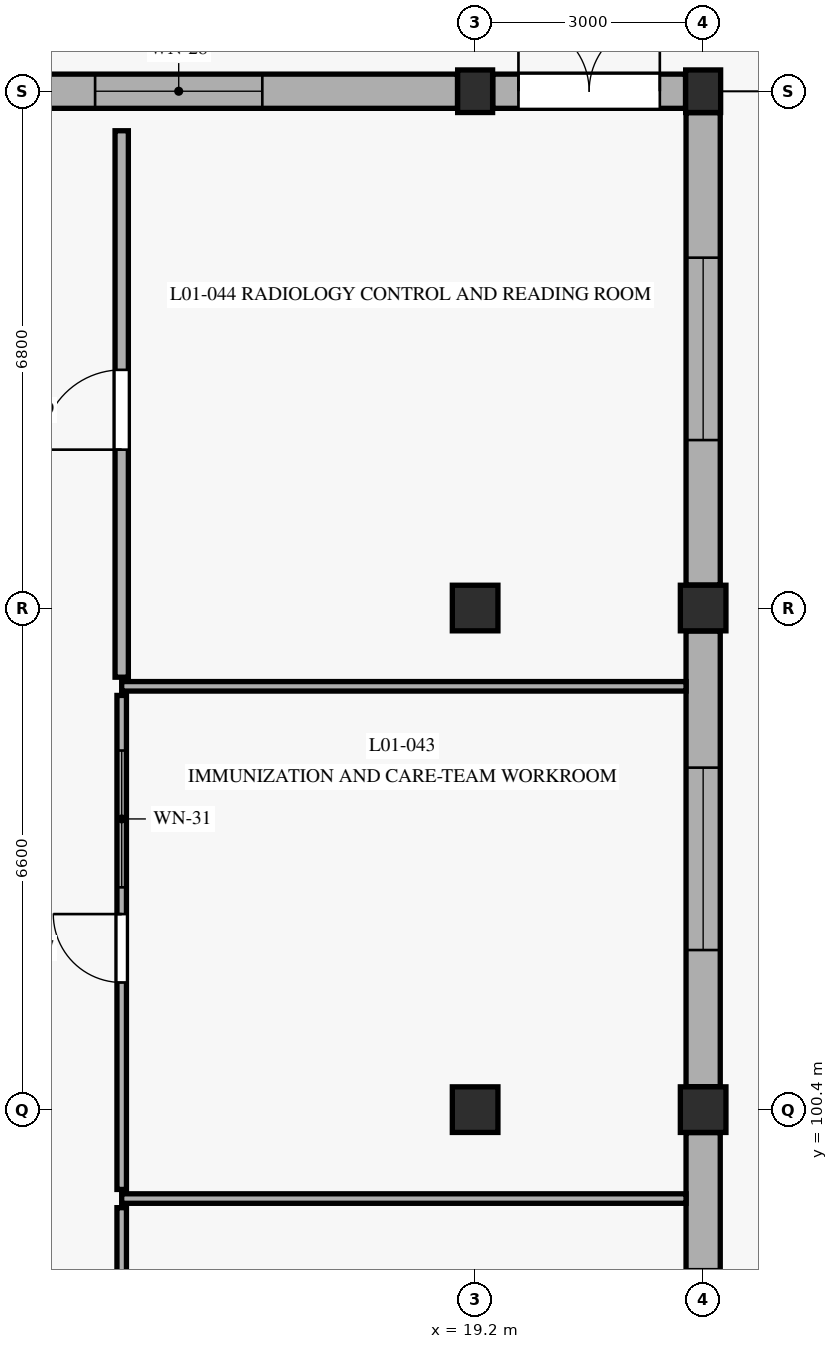
"""IFC4 building model, lengths in metres.
Left out: names, types, materials, properties, quantities, classifications, styles, units other than length and angle.
Written with IfcOpenShell. Run it as: python <this file> out.ifc"""

import sys

from ifc_helpers import new_model, si_unit, direction, frame, frame_2d, origin, origin_with_axes, origin_2d, place, context, subcontext, project, spatial, rectangle, extrude, element, fill, save


model = new_model("IFC4")
c1 = context("Model", 3, precision=1e-05, world=origin(), true_north=direction((0.0, 1.0)))
c2 = subcontext(c1, "Body", "Model", "MODEL_VIEW")
j1 = project(units=[si_unit("LENGTHUNIT", "METRE"), si_unit("PLANEANGLEUNIT", "RADIAN")], contexts=[c1])
p1 = place(None, origin())
s1 = spatial("IfcSite", under=j1, at=p1, CompositionType="ELEMENT")
p2 = place(p1, origin())
s2 = spatial("IfcBuilding", under=s1, at=p2, CompositionType="ELEMENT")
p3 = place(p2, origin())
s3 = spatial("IfcBuildingStorey", under=s2, at=p3, CompositionType="ELEMENT", Elevation=0.0)
for number, where, z_axis, x_axis in (
    (1, (19.2, 100.4, 0.0), (0.0, 0.0, 1.0), (1.0, 0.0, 0.0)),
    (2, (19.2, 107.0, 0.0), (0.0, 0.0, 1.0), (1.0, 0.0, 0.0)),
):
    element("IfcColumn", number, at=place(p3, frame(where, z_axis=z_axis, x_axis=x_axis)), inside=s3, PredefinedType="COLUMN", context=c2, shape_type="SweptSolid", body=[
        extrude(rectangle(XDim=0.6, YDim=0.6, at=origin_2d()), origin(), (0.0, 0.0, 1.0), 4.8),
    ])
p4 = place(p3, frame((19.2, 113.8, 0.0), z_axis=(0.0, 0.0, 1.0), x_axis=(1.0, 0.0, 0.0)))
e3 = element("IfcColumn", 3, at=p4, inside=s3, PredefinedType="COLUMN", context=c2, shape_type="SweptSolid", body=[
    extrude(rectangle(XDim=0.46, YDim=0.56, at=origin_2d()), origin(), (0.0, 0.0, 1.0), 4.8),
])
for number, where, z_axis, x_axis in (
    (4, (22.2, 100.4, 0.0), (0.0, 0.0, 1.0), (1.0, 0.0, 0.0)),
    (5, (22.2, 107.0, 0.0), (0.0, 0.0, 1.0), (1.0, 0.0, 0.0)),
):
    element("IfcColumn", number, at=place(p3, frame(where, z_axis=z_axis, x_axis=x_axis)), inside=s3, PredefinedType="COLUMN", context=c2, shape_type="SweptSolid", body=[
        extrude(rectangle(XDim=0.6, YDim=0.6, at=origin_2d()), origin(), (0.0, 0.0, 1.0), 4.8),
    ])
p5 = place(p3, frame((22.2, 113.8, 0.0), z_axis=(0.0, 0.0, 1.0), x_axis=(1.0, 0.0, 0.0)))
e6 = element("IfcColumn", 6, at=p5, inside=s3, PredefinedType="COLUMN", context=c2, shape_type="SweptSolid", body=[
    extrude(rectangle(XDim=0.46, YDim=0.56, at=origin_2d()), origin(), (0.0, 0.0, 1.0), 4.8),
])
p6 = place(p3, frame((22.2, 94.102, 0.0), z_axis=(0.0, 0.0, 1.0), x_axis=(0.0, 1.0, 0.0)))
e7 = element("IfcWall", 7, at=p6, inside=s3, PredefinedType="SOLIDWALL", context=c2, shape_type="SweptSolid", body=[
    extrude(rectangle(XDim=5.996, YDim=0.45, at=frame_2d((2.998, 0.0))), origin(), (0.0, 0.0, 1.0), 3.96),
])
p7 = place(p6, frame((1.798, 0.0, 0.6)))
e8 = element("IfcOpeningElement", 8, at=p7, cuts=e7, PredefinedType="OPENING", context=c2, shape_type="SweptSolid", body=[
    extrude(rectangle(XDim=2.4, YDim=2.5, at=frame_2d((1.2, 1.25))), frame((0.0, 0.235, 0.0), z_axis=(0.0, -1.0, 0.0), x_axis=(1.0, 0.0, 0.0)), (0.0, 0.0, 1.0), 0.47),
])
p8 = place(p3, frame((22.2, 100.702, 0.0), z_axis=(0.0, 0.0, 1.0), x_axis=(0.0, 1.0, 0.0)))
e9 = element("IfcWall", 9, at=p8, inside=s3, PredefinedType="SOLIDWALL", context=c2, shape_type="SweptSolid", body=[
    extrude(rectangle(XDim=5.996, YDim=0.45, at=frame_2d((2.998, 0.0))), origin(), (0.0, 0.0, 1.0), 4.09),
])
p9 = place(p8, frame((1.798, 0.0, 0.6)))
e10 = element("IfcOpeningElement", 10, at=p9, cuts=e9, PredefinedType="OPENING", context=c2, shape_type="SweptSolid", body=[
    extrude(rectangle(XDim=2.4, YDim=2.5, at=frame_2d((1.2, 1.25))), frame((0.0, 0.235, 0.0), z_axis=(0.0, -1.0, 0.0), x_axis=(1.0, 0.0, 0.0)), (0.0, 0.0, 1.0), 0.47),
])
p10 = place(p3, frame((22.2, 107.302, 0.0), z_axis=(0.0, 0.0, 1.0), x_axis=(0.0, 1.0, 0.0)))
e11 = element("IfcWall", 11, at=p10, inside=s3, PredefinedType="SOLIDWALL", context=c2, shape_type="SweptSolid", body=[
    extrude(rectangle(XDim=6.216, YDim=0.45, at=frame_2d((3.108, 0.0))), origin(), (0.0, 0.0, 1.0), 4.09),
])
p11 = place(p10, frame((1.908, 0.0, 0.6)))
e12 = element("IfcOpeningElement", 12, at=p11, cuts=e11, PredefinedType="OPENING", context=c2, shape_type="SweptSolid", body=[
    extrude(rectangle(XDim=2.4, YDim=2.5, at=frame_2d((1.2, 1.25))), frame((0.0, 0.235, 0.0), z_axis=(0.0, -1.0, 0.0), x_axis=(1.0, 0.0, 0.0)), (0.0, 0.0, 1.0), 0.47),
])
p12 = place(p3, frame((21.968, 113.8, 0.0), z_axis=(0.0, 0.0, 1.0), x_axis=(-1.0, 0.0, 0.0)))
e13 = element("IfcWall", 13, at=p12, inside=s3, PredefinedType="SOLIDWALL", context=c2, shape_type="SweptSolid", body=[
    extrude(rectangle(XDim=2.536, YDim=0.45, at=frame_2d((1.268, 0.0))), origin(), (0.0, 0.0, 1.0), 3.92),
])
p13 = place(p12, frame((0.338, 0.0, 0.0)))
e14 = element("IfcOpeningElement", 14, at=p13, cuts=e13, PredefinedType="OPENING", context=c2, shape_type="SweptSolid", body=[
    extrude(rectangle(XDim=1.86, YDim=2.5, at=frame_2d((0.93, 1.25))), frame((0.0, 0.235, 0.0), z_axis=(0.0, -1.0, 0.0), x_axis=(1.0, 0.0, 0.0)), (0.0, 0.0, 1.0), 0.47),
])
p14 = place(p3, frame((18.968, 113.8, 0.0), z_axis=(0.0, 0.0, 1.0), x_axis=(-1.0, 0.0, 0.0)))
e15 = element("IfcWall", 15, at=p14, inside=s3, PredefinedType="SOLIDWALL", context=c2, shape_type="SweptSolid", body=[
    extrude(rectangle(XDim=7.336, YDim=0.45, at=frame_2d((3.668, 0.0))), origin(), (0.0, 0.0, 1.0), 3.92),
])
p15 = place(p14, frame((2.568, 0.0, 0.9)))
e16 = element("IfcOpeningElement", 16, at=p15, cuts=e15, PredefinedType="OPENING", context=c2, shape_type="SweptSolid", body=[
    extrude(rectangle(XDim=2.2, YDim=1.1, at=frame_2d((1.1, 0.55))), frame((0.0, 0.235, 0.0), z_axis=(0.0, -1.0, 0.0), x_axis=(1.0, 0.0, 0.0)), (0.0, 0.0, 1.0), 0.47),
])
p16 = place(p3, frame((14.55, 94.12, 0.0), z_axis=(0.0, 0.0, 1.0), x_axis=(0.0, 1.0, 0.0)))
e17 = element("IfcWall", 17, at=p16, inside=s3, PredefinedType="PARTITIONING", context=c2, shape_type="SweptSolid", body=[
    extrude(rectangle(XDim=4.99, YDim=0.125, at=frame_2d((2.495, 0.0))), origin(), (0.0, 0.0, 1.0), 4.015),
])
p17 = place(p16, frame((1.91, 0.0, 0.0)))
e18 = element("IfcOpeningElement", 18, at=p17, cuts=e17, PredefinedType="OPENING", context=c2, shape_type="SweptSolid", body=[
    extrude(rectangle(XDim=1.02, YDim=2.18, at=frame_2d((0.51, 1.09))), frame((0.0, 0.073, 0.0), z_axis=(0.0, -1.0, 0.0), x_axis=(1.0, 0.0, 0.0)), (0.0, 0.0, 1.0), 0.145),
])
p18 = place(p3, frame((14.55, 99.23, 0.0), z_axis=(0.0, 0.0, 1.0), x_axis=(1.0, 0.0, 0.0)))
e19 = element("IfcWall", 19, at=p18, inside=s3, PredefinedType="PARTITIONING", context=c2, shape_type="SweptSolid", body=[
    extrude(rectangle(XDim=7.425, YDim=0.125, at=frame_2d((3.712, 0.0))), origin(), (0.0, 0.0, 1.0), 3.895),
])
p19 = place(p3, frame((14.55, 99.35, 0.0), z_axis=(0.0, 0.0, 1.0), x_axis=(0.0, 1.0, 0.0)))
e20 = element("IfcWall", 20, at=p19, inside=s3, PredefinedType="PARTITIONING", context=c2, shape_type="SweptSolid", body=[
    extrude(rectangle(XDim=6.5, YDim=0.125, at=frame_2d((3.25, 0.0))), origin(), (0.0, 0.0, 1.0), 4.015),
])
p20 = place(p19, frame((2.723, 0.0, 0.0)))
e21 = element("IfcOpeningElement", 21, at=p20, cuts=e20, PredefinedType="OPENING", context=c2, shape_type="SweptSolid", body=[
    extrude(rectangle(XDim=0.9, YDim=2.12, at=frame_2d((0.45, 1.06))), frame((0.0, 0.073, 0.0), z_axis=(0.0, -1.0, 0.0), x_axis=(1.0, 0.0, 0.0)), (0.0, 0.0, 1.0), 0.145),
])
p21 = place(p19, frame((3.975, 0.0, 1.05)))
e22 = element("IfcOpeningElement", 22, at=p21, cuts=e20, PredefinedType="OPENING", context=c2, shape_type="SweptSolid", body=[
    extrude(rectangle(XDim=1.8, YDim=1.25, at=frame_2d((0.9, 0.625))), frame((0.0, 0.073, 0.0), z_axis=(0.0, -1.0, 0.0), x_axis=(1.0, 0.0, 0.0)), (0.0, 0.0, 1.0), 0.145),
])
p22 = place(p3, frame((14.55, 105.97, 0.0), z_axis=(0.0, 0.0, 1.0), x_axis=(1.0, 0.0, 0.0)))
e23 = element("IfcWall", 23, at=p22, inside=s3, PredefinedType="PARTITIONING", context=c2, shape_type="SweptSolid", body=[
    extrude(rectangle(XDim=7.425, YDim=0.125, at=frame_2d((3.712, 0.0))), origin(), (0.0, 0.0, 1.0), 3.895),
])
p23 = place(p3, frame((14.55, 106.09, 0.0), z_axis=(0.0, 0.0, 1.0), x_axis=(0.0, 1.0, 0.0)))
e24 = element("IfcWall", 24, at=p23, inside=s3, PredefinedType="PARTITIONING", context=c2, shape_type="SweptSolid", body=[
    extrude(rectangle(XDim=7.19, YDim=0.175, at=frame_2d((3.595, 0.0))), origin(), (0.0, 0.0, 1.0), 4.015),
])
p24 = place(p23, frame((2.994, 0.0, 0.0)))
e25 = element("IfcOpeningElement", 25, at=p24, cuts=e24, PredefinedType="OPENING", context=c2, shape_type="SweptSolid", body=[
    extrude(rectangle(XDim=1.05, YDim=2.24, at=frame_2d((0.525, 1.12))), frame((0.0, 0.098, 0.0), z_axis=(0.0, -1.0, 0.0), x_axis=(1.0, 0.0, 0.0)), (0.0, 0.0, 1.0), 0.195),
])
p25 = place(p9, origin_with_axes())
e26 = element("IfcWindow", 26, at=p25, inside=s3, PartitioningType="SINGLE_PANEL", PredefinedType="WINDOW", context=c2, shape_type="SweptSolid", body=[
    extrude(rectangle(XDim=2.4, YDim=2.5, at=frame_2d((1.2, 1.25))), frame((0.0, 0.03, 0.0), z_axis=(0.0, -1.0, 0.0), x_axis=(1.0, 0.0, 0.0)), (0.0, 0.0, 1.0), 0.06),
])
fill(e10, e26)
p26 = place(p11, origin_with_axes())
e27 = element("IfcWindow", 27, at=p26, inside=s3, PartitioningType="SINGLE_PANEL", PredefinedType="WINDOW", context=c2, shape_type="SweptSolid", body=[
    extrude(rectangle(XDim=2.4, YDim=2.5, at=frame_2d((1.2, 1.25))), frame((0.0, 0.03, 0.0), z_axis=(0.0, -1.0, 0.0), x_axis=(1.0, 0.0, 0.0)), (0.0, 0.0, 1.0), 0.06),
])
fill(e12, e27)
p27 = place(p13, frame((1.86, 0.0, 0.0), z_axis=(0.0, 0.0, 1.0), x_axis=(-1.0, 0.0, 0.0)))
e28 = element("IfcDoor", 28, at=p27, inside=s3, OperationType="DOUBLE_DOOR_SINGLE_SWING", PredefinedType="DOOR", context=c2, shape_type="SweptSolid", body=[
    extrude(rectangle(XDim=1.86, YDim=2.5, at=frame_2d((0.93, 1.25))), frame((0.0, 0.025, 0.0), z_axis=(0.0, -1.0, 0.0), x_axis=(1.0, 0.0, 0.0)), (0.0, 0.0, 1.0), 0.05),
])
fill(e14, e28)
p28 = place(p15, origin_with_axes())
e29 = element("IfcWindow", 29, at=p28, inside=s3, PartitioningType="SINGLE_PANEL", PredefinedType="WINDOW", context=c2, shape_type="SweptSolid", body=[
    extrude(rectangle(XDim=2.2, YDim=1.1, at=frame_2d((1.1, 0.55))), frame((0.0, 0.03, 0.0), z_axis=(0.0, -1.0, 0.0), x_axis=(1.0, 0.0, 0.0)), (0.0, 0.0, 1.0), 0.06),
])
fill(e16, e29)
p29 = place(p20, frame((0.9, 0.0, 0.0), z_axis=(0.0, 0.0, 1.0), x_axis=(-1.0, 0.0, 0.0)))
e30 = element("IfcDoor", 30, at=p29, inside=s3, OperationType="SINGLE_SWING_LEFT", PredefinedType="DOOR", context=c2, shape_type="SweptSolid", body=[
    extrude(rectangle(XDim=0.9, YDim=2.12, at=frame_2d((0.45, 1.06))), frame((0.0, 0.025, 0.0), z_axis=(0.0, -1.0, 0.0), x_axis=(1.0, 0.0, 0.0)), (0.0, 0.0, 1.0), 0.05),
])
fill(e21, e30)
p30 = place(p21, origin_with_axes())
e31 = element("IfcWindow", 31, at=p30, inside=s3, PartitioningType="SINGLE_PANEL", PredefinedType="WINDOW", context=c2, shape_type="SweptSolid", body=[
    extrude(rectangle(XDim=1.8, YDim=1.25, at=frame_2d((0.9, 0.625))), frame((0.0, 0.03, 0.0), z_axis=(0.0, -1.0, 0.0), x_axis=(1.0, 0.0, 0.0)), (0.0, 0.0, 1.0), 0.06),
])
fill(e22, e31)
p31 = place(p24, frame((1.05, 0.0, 0.0), z_axis=(0.0, 0.0, 1.0), x_axis=(-1.0, 0.0, 0.0)))
e32 = element("IfcDoor", 32, at=p31, inside=s3, OperationType="SINGLE_SWING_RIGHT", PredefinedType="DOOR", context=c2, shape_type="SweptSolid", body=[
    extrude(rectangle(XDim=1.05, YDim=2.24, at=frame_2d((0.525, 1.12))), frame((0.0, 0.025, 0.0), z_axis=(0.0, -1.0, 0.0), x_axis=(1.0, 0.0, 0.0)), (0.0, 0.0, 1.0), 0.05),
])
fill(e25, e32)
save(model, sys.argv[1])
